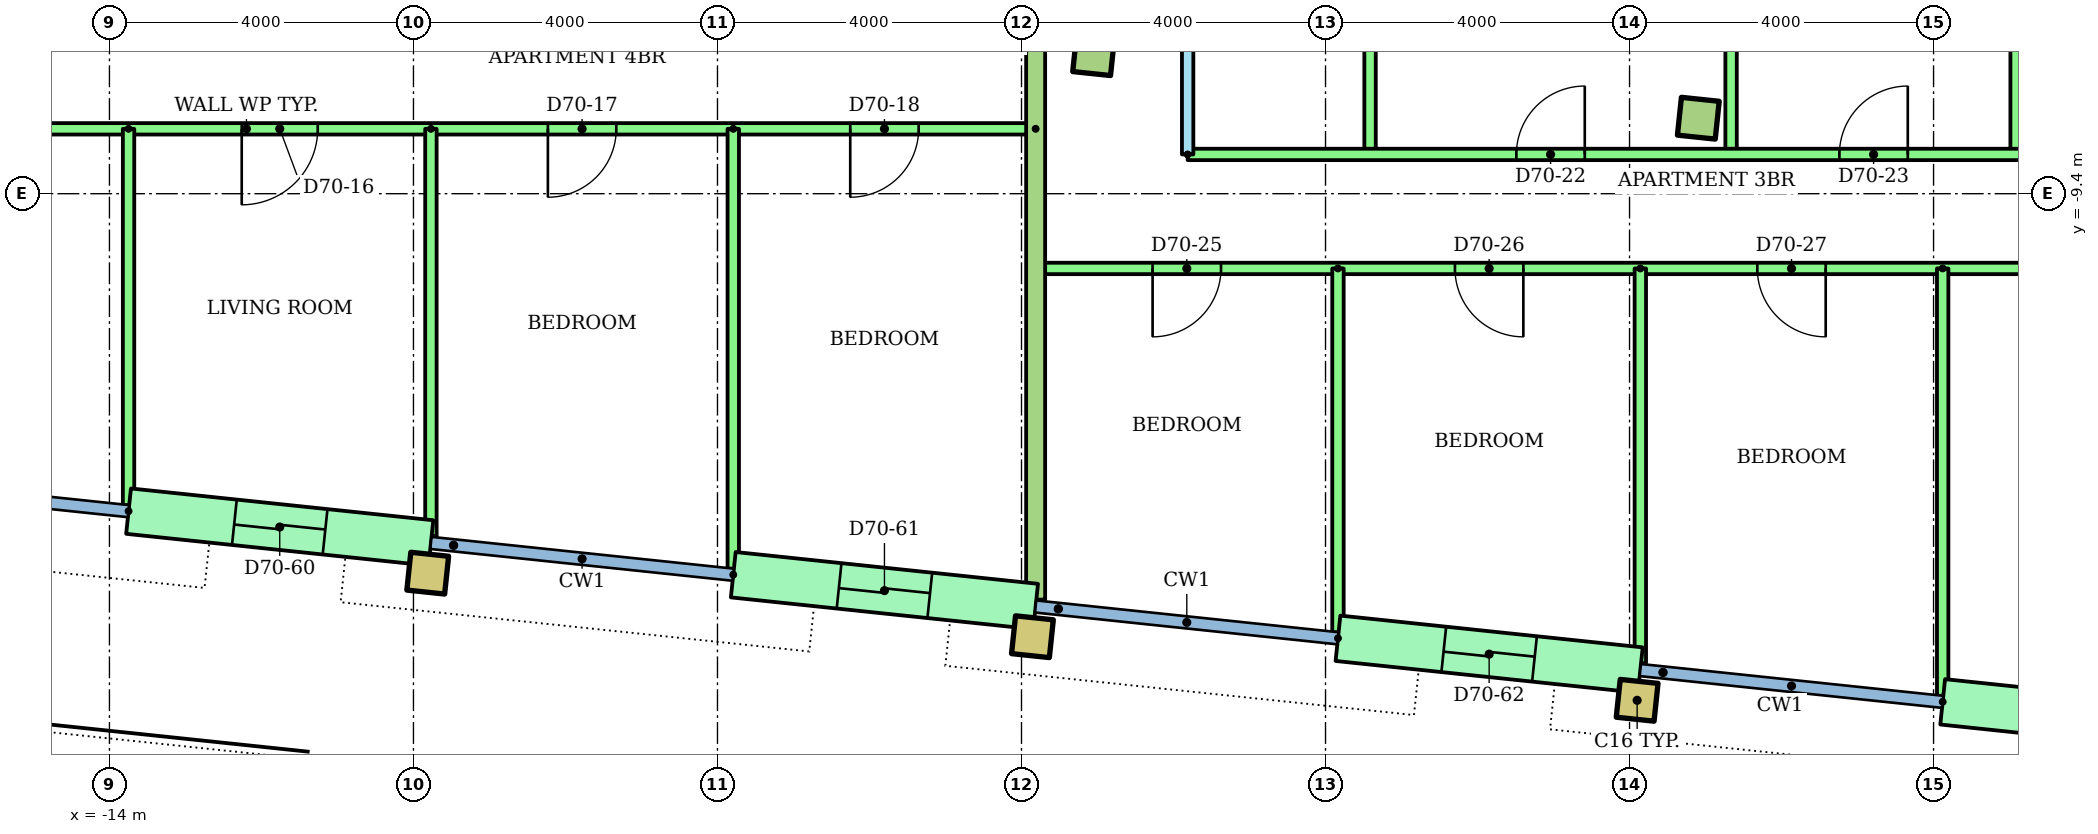
"""IFC4 building model, lengths in metres.
Left out: names, types, materials, properties, quantities, classifications, styles, units other than length and angle.
Written with IfcOpenShell. Run it as: python <this file> out.ifc"""

import sys

from ifc_helpers import new_model, si_unit, direction, frame, frame_2d, origin, origin_2d, place, context, subcontext, project, spatial, rectangle, hollow_rectangle, extrude, element, fill, save


model = new_model("IFC4")
c1 = context("Model", 3, precision=1e-05, world=origin(), true_north=direction((0.0, 1.0)))
c2 = subcontext(c1, "Body", "Model", "MODEL_VIEW")
j1 = project(units=[si_unit("LENGTHUNIT", "METRE"), si_unit("PLANEANGLEUNIT", "RADIAN")], contexts=[c1])
p1 = place(None, origin())
s1 = spatial("IfcSite", under=j1, at=p1, CompositionType="ELEMENT")
p2 = place(p1, origin())
s2 = spatial("IfcBuilding", under=s1, at=p2, CompositionType="ELEMENT")
p3 = place(p2, frame((0.0, 0.0, 269.1)))
s3 = spatial("IfcBuildingStorey", under=s2, at=p3, CompositionType="ELEMENT", Elevation=269.1)
for number, where, z_axis, x_axis in (
    (1, (-9.812, -14.392, 0.0), (0.0, 0.0, 1.0), (0.995, -0.105, 0.0)),
    (2, (-1.856, -15.229, 0.0), (0.0, 0.0, 1.0), (0.995, -0.105, 0.0)),
    (3, (6.1, -16.065, 0.0), (0.0, 0.0, 1.0), (0.995, -0.105, 0.0)),
):
    element("IfcColumn", number, at=place(p3, frame(where, z_axis=z_axis, x_axis=x_axis)), inside=s3, PredefinedType="COLUMN", context=c2, shape_type="SweptSolid", body=[
        extrude(hollow_rectangle(XDim=0.5, YDim=0.5, WallThickness=0.025, at=origin_2d()), origin(), (0.0, 0.0, 1.0), 3.2),
    ])
for number, where, z_axis, x_axis in (
    (4, (-1.051, -7.571, 0.0), (0.0, 0.0, 1.0), (0.995, -0.105, 0.0)),
    (5, (6.905, -8.407, 0.0), (0.0, 0.0, 1.0), (0.995, -0.105, 0.0)),
):
    element("IfcColumn", number, at=place(p3, frame(where, z_axis=z_axis, x_axis=x_axis)), inside=s3, PredefinedType="COLUMN", context=c2, shape_type="SweptSolid", body=[
        extrude(rectangle(XDim=0.5, YDim=0.5, at=origin_2d()), origin(), (0.0, 0.0, 1.0), 3.2),
    ])
p4 = place(p3, frame((-13.749, -13.576, 0.0), z_axis=(0.0, 0.0, 1.0), x_axis=(0.994519156568, -0.104554517933, 0.0)))
e6 = element("IfcWall", 6, at=p4, inside=s3, PredefinedType="STANDARD", context=c2, shape_type="SweptSolid", body=[
    extrude(rectangle(XDim=4.0, YDim=0.6, at=frame_2d((2.0, 0.0))), origin(), (0.0, 0.0, 1.0), 2.92),
])
p5 = place(p4, frame((1.4, 0.0, 0.0)))
e7 = element("IfcOpeningElement", 7, at=p5, cuts=e6, PredefinedType="OPENING", context=c2, shape_type="SweptSolid", body=[
    extrude(rectangle(XDim=1.2, YDim=2.1, at=frame_2d((0.6, 1.05))), frame((0.0, 0.31, 0.0), z_axis=(0.0, -1.0, 0.0), x_axis=(1.0, 0.0, 0.0)), (0.0, 0.0, 1.0), 0.62),
])
p6 = place(p3, frame((-5.792, -14.413, 0.0), z_axis=(0.0, 0.0, 1.0), x_axis=(0.99452550138, -0.104494148666, 0.0)))
e8 = element("IfcWall", 8, at=p6, inside=s3, PredefinedType="STANDARD", context=c2, shape_type="SweptSolid", body=[
    extrude(rectangle(XDim=4.0, YDim=0.6, at=frame_2d((2.0, 0.0))), origin(), (0.0, 0.0, 1.0), 2.92),
])
p7 = place(p6, frame((1.4, 0.0, 0.0)))
e9 = element("IfcOpeningElement", 9, at=p7, cuts=e8, PredefinedType="OPENING", context=c2, shape_type="SweptSolid", body=[
    extrude(rectangle(XDim=1.2, YDim=2.1, at=frame_2d((0.6, 1.05))), frame((0.0, 0.31, 0.0), z_axis=(0.0, -1.0, 0.0), x_axis=(1.0, 0.0, 0.0)), (0.0, 0.0, 1.0), 0.62),
])
p8 = place(p3, frame((2.164, -15.249, 0.0), z_axis=(0.0, 0.0, 1.0), x_axis=(0.99452550138, -0.104494148666, 0.0)))
e10 = element("IfcWall", 10, at=p8, inside=s3, PredefinedType="STANDARD", context=c2, shape_type="SweptSolid", body=[
    extrude(rectangle(XDim=4.0, YDim=0.6, at=frame_2d((2.0, 0.0))), origin(), (0.0, 0.0, 1.0), 2.92),
])
p9 = place(p8, frame((1.4, 0.0, 0.0)))
e11 = element("IfcOpeningElement", 11, at=p9, cuts=e10, PredefinedType="OPENING", context=c2, shape_type="SweptSolid", body=[
    extrude(rectangle(XDim=1.2, YDim=2.1, at=frame_2d((0.6, 1.05))), frame((0.0, 0.31, 0.0), z_axis=(0.0, -1.0, 0.0), x_axis=(1.0, 0.0, 0.0)), (0.0, 0.0, 1.0), 0.62),
])
p10 = place(p3, frame((10.12, -16.085, 0.0), z_axis=(0.0, 0.0, 1.0), x_axis=(0.994519156568, -0.104554517933, 0.0)))
e12 = element("IfcWall", 12, at=p10, inside=s3, PredefinedType="STANDARD", context=c2, shape_type="SweptSolid", body=[
    extrude(rectangle(XDim=4.0, YDim=0.6, at=frame_2d((2.0, 0.0))), origin(), (0.0, 0.0, 1.0), 2.92),
])
p11 = place(p10, frame((1.4, 0.0, 0.0)))
e13 = element("IfcOpeningElement", 13, at=p11, cuts=e12, PredefinedType="OPENING", context=c2, shape_type="SweptSolid", body=[
    extrude(rectangle(XDim=1.2, YDim=2.1, at=frame_2d((0.6, 1.05))), frame((0.0, 0.31, 0.0), z_axis=(0.0, -1.0, 0.0), x_axis=(1.0, 0.0, 0.0)), (0.0, 0.0, 1.0), 0.62),
])
p12 = place(p3, frame((-1.814, -8.547, 0.0), z_axis=(0.0, 0.0, 1.0), x_axis=(-1.0, 0.0, 0.0)))
e14 = element("IfcWall", 14, at=p12, inside=s3, PredefinedType="PARTITIONING", context=c2, shape_type="SweptSolid", body=[
    extrude(rectangle(XDim=20.767, YDim=0.15, at=frame_2d((10.384, 0.0))), origin(), (0.0, 0.0, 1.0), 2.4),
])
p13 = place(p12, frame((16.604, 0.0, 0.0)))
e15 = element("IfcOpeningElement", 15, at=p13, cuts=e14, PredefinedType="OPENING", context=c2, shape_type="SweptSolid", body=[
    extrude(rectangle(XDim=0.9, YDim=2.1, at=frame_2d((0.45, 1.05))), frame((0.0, 0.085, 0.0), z_axis=(0.0, -1.0, 0.0), x_axis=(1.0, 0.0, 0.0)), (0.0, 0.0, 1.0), 0.17),
])
p14 = place(p12, frame((9.446, 0.0, 0.0)))
e16 = element("IfcOpeningElement", 16, at=p14, cuts=e14, PredefinedType="OPENING", context=c2, shape_type="SweptSolid", body=[
    extrude(rectangle(XDim=1.0, YDim=2.1, at=frame_2d((0.5, 1.05))), frame((0.0, 0.085, 0.0), z_axis=(0.0, -1.0, 0.0), x_axis=(1.0, 0.0, 0.0)), (0.0, 0.0, 1.0), 0.17),
])
p15 = place(p12, frame((5.517, 0.0, 0.0)))
e17 = element("IfcOpeningElement", 17, at=p15, cuts=e14, PredefinedType="OPENING", context=c2, shape_type="SweptSolid", body=[
    extrude(rectangle(XDim=0.9, YDim=2.1, at=frame_2d((0.45, 1.05))), frame((0.0, 0.085, 0.0), z_axis=(0.0, -1.0, 0.0), x_axis=(1.0, 0.0, 0.0)), (0.0, 0.0, 1.0), 0.17),
])
p16 = place(p12, frame((1.539, 0.0, 0.0)))
e18 = element("IfcOpeningElement", 18, at=p16, cuts=e14, PredefinedType="OPENING", context=c2, shape_type="SweptSolid", body=[
    extrude(rectangle(XDim=0.9, YDim=2.1, at=frame_2d((0.45, 1.05))), frame((0.0, 0.085, 0.0), z_axis=(0.0, -1.0, 0.0), x_axis=(1.0, 0.0, 0.0)), (0.0, 0.0, 1.0), 0.17),
])
p17 = place(p3, frame((-13.749, -8.547, 0.0), z_axis=(0.0, 0.0, 1.0), x_axis=(0.0, -1.0, 0.0)))
e19 = element("IfcWall", 19, at=p17, inside=s3, PredefinedType="PARTITIONING", context=c2, shape_type="SweptSolid", body=[
    extrude(rectangle(XDim=4.95, YDim=0.15, at=frame_2d((2.475, 0.0))), origin(), (0.0, 0.0, 1.0), 2.4),
])
p18 = place(p3, frame((-9.771, -8.547, 0.0), z_axis=(0.0, 0.0, 1.0), x_axis=(0.0, -1.0, 0.0)))
e20 = element("IfcWall", 20, at=p18, inside=s3, PredefinedType="PARTITIONING", context=c2, shape_type="SweptSolid", body=[
    extrude(rectangle(XDim=5.358, YDim=0.15, at=frame_2d((2.679, 0.0))), origin(), (0.0, 0.0, 1.0), 2.4),
])
p19 = place(p3, frame((-5.792, -8.547, 0.0), z_axis=(0.0, 0.0, 1.0), x_axis=(0.0, -1.0, 0.0)))
e21 = element("IfcWall", 21, at=p19, inside=s3, PredefinedType="PARTITIONING", context=c2, shape_type="SweptSolid", body=[
    extrude(rectangle(XDim=5.787, YDim=0.15, at=frame_2d((2.893, 0.0))), origin(), (0.0, 0.0, 1.0), 2.4),
])
p20 = place(p3, frame((0.186, -1.4, 0.0), z_axis=(0.0, 0.0, 1.0), x_axis=(0.0, -1.0, 0.0)))
e22 = element("IfcWall", 22, at=p20, inside=s3, PredefinedType="PARTITIONING", context=c2, shape_type="SweptSolid", body=[
    extrude(rectangle(XDim=7.484, YDim=0.15, at=frame_2d((3.742, 0.0))), origin(), (0.0, 0.0, 1.0), 2.4),
])
p21 = place(p20, frame((1.55, 0.0, 0.0)))
e23 = element("IfcOpeningElement", 23, at=p21, cuts=e22, PredefinedType="OPENING", context=c2, shape_type="SweptSolid", body=[
    extrude(rectangle(XDim=0.9, YDim=2.1, at=frame_2d((0.45, 1.05))), frame((0.0, 0.085, 0.0), z_axis=(0.0, -1.0, 0.0), x_axis=(1.0, 0.0, 0.0)), (0.0, 0.0, 1.0), 0.17),
])
p22 = place(p20, frame((4.966, 0.0, 0.0)))
e24 = element("IfcOpeningElement", 24, at=p22, cuts=e22, PredefinedType="OPENING", context=c2, shape_type="SweptSolid", body=[
    extrude(rectangle(XDim=0.8, YDim=2.1, at=frame_2d((0.4, 1.05))), frame((0.0, 0.085, 0.0), z_axis=(0.0, -1.0, 0.0), x_axis=(1.0, 0.0, 0.0)), (0.0, 0.0, 1.0), 0.17),
])
for number, where, z_axis, x_axis in (
    (25, (2.586, -1.4, 0.0), (0.0, 0.0, 1.0), (0.0, -1.0, 0.0)),
    (26, (7.336, -1.4, 0.0), (0.0, 0.0, 1.0), (0.0, -1.0, 0.0)),
    (27, (11.086, -1.4, 0.0), (0.0, 0.0, 1.0), (0.0, -1.0, 0.0)),
):
    element("IfcWall", number, at=place(p3, frame(where, z_axis=z_axis, x_axis=x_axis)), inside=s3, PredefinedType="PARTITIONING", context=c2, shape_type="SweptSolid", body=[
        extrude(rectangle(XDim=7.484, YDim=0.15, at=frame_2d((3.742, 0.0))), origin(), (0.0, 0.0, 1.0), 2.4),
    ])
p23 = place(p3, frame((0.186, -8.884, 0.0)))
e28 = element("IfcWall", 28, at=p23, inside=s3, PredefinedType="PARTITIONING", context=c2, shape_type="SweptSolid", body=[
    extrude(rectangle(XDim=13.912, YDim=0.15, at=frame_2d((6.956, 0.0))), origin(), (0.0, 0.0, 1.0), 2.4),
])
p24 = place(p23, frame((4.325, 0.0, 0.0)))
e29 = element("IfcOpeningElement", 29, at=p24, cuts=e28, PredefinedType="OPENING", context=c2, shape_type="SweptSolid", body=[
    extrude(rectangle(XDim=0.9, YDim=2.1, at=frame_2d((0.45, 1.05))), frame((0.0, 0.085, 0.0), z_axis=(0.0, -1.0, 0.0), x_axis=(1.0, 0.0, 0.0)), (0.0, 0.0, 1.0), 0.17),
])
p25 = place(p23, frame((8.575, 0.0, 0.0)))
e30 = element("IfcOpeningElement", 30, at=p25, cuts=e28, PredefinedType="OPENING", context=c2, shape_type="SweptSolid", body=[
    extrude(rectangle(XDim=0.9, YDim=2.1, at=frame_2d((0.45, 1.05))), frame((0.0, 0.085, 0.0), z_axis=(0.0, -1.0, 0.0), x_axis=(1.0, 0.0, 0.0)), (0.0, 0.0, 1.0), 0.17),
])
p26 = place(p23, frame((11.956, 0.0, 0.0)))
e31 = element("IfcOpeningElement", 31, at=p26, cuts=e28, PredefinedType="OPENING", context=c2, shape_type="SweptSolid", body=[
    extrude(rectangle(XDim=0.9, YDim=2.1, at=frame_2d((0.45, 1.05))), frame((0.0, 0.085, 0.0), z_axis=(0.0, -1.0, 0.0), x_axis=(1.0, 0.0, 0.0)), (0.0, 0.0, 1.0), 0.17),
])
p27 = place(p3, frame((14.098, -10.384, 0.0), z_axis=(0.0, 0.0, 1.0), x_axis=(-1.0, 0.0, 0.0)))
e32 = element("IfcWall", 32, at=p27, inside=s3, PredefinedType="PARTITIONING", context=c2, shape_type="SweptSolid", body=[
    extrude(rectangle(XDim=15.912, YDim=0.15, at=frame_2d((7.956, 0.0))), origin(), (0.0, 0.0, 1.0), 2.4),
])
p28 = place(p27, frame((13.473, 0.0, 0.0)))
e33 = element("IfcOpeningElement", 33, at=p28, cuts=e32, PredefinedType="OPENING", context=c2, shape_type="SweptSolid", body=[
    extrude(rectangle(XDim=0.9, YDim=2.1, at=frame_2d((0.45, 1.05))), frame((0.0, 0.085, 0.0), z_axis=(0.0, -1.0, 0.0), x_axis=(1.0, 0.0, 0.0)), (0.0, 0.0, 1.0), 0.17),
])
p29 = place(p27, frame((9.495, 0.0, 0.0)))
e34 = element("IfcOpeningElement", 34, at=p29, cuts=e32, PredefinedType="OPENING", context=c2, shape_type="SweptSolid", body=[
    extrude(rectangle(XDim=0.9, YDim=2.1, at=frame_2d((0.45, 1.05))), frame((0.0, 0.085, 0.0), z_axis=(0.0, -1.0, 0.0), x_axis=(1.0, 0.0, 0.0)), (0.0, 0.0, 1.0), 0.17),
])
p30 = place(p27, frame((5.517, 0.0, 0.0)))
e35 = element("IfcOpeningElement", 35, at=p30, cuts=e32, PredefinedType="OPENING", context=c2, shape_type="SweptSolid", body=[
    extrude(rectangle(XDim=0.9, YDim=2.1, at=frame_2d((0.45, 1.05))), frame((0.0, 0.085, 0.0), z_axis=(0.0, -1.0, 0.0), x_axis=(1.0, 0.0, 0.0)), (0.0, 0.0, 1.0), 0.17),
])
p31 = place(p27, frame((1.489, 0.0, 0.0)))
e36 = element("IfcOpeningElement", 36, at=p31, cuts=e32, PredefinedType="OPENING", context=c2, shape_type="SweptSolid", body=[
    extrude(rectangle(XDim=1.0, YDim=2.1, at=frame_2d((0.5, 1.05))), frame((0.0, 0.085, 0.0), z_axis=(0.0, -1.0, 0.0), x_axis=(1.0, 0.0, 0.0)), (0.0, 0.0, 1.0), 0.17),
])
p32 = place(p3, frame((2.164, -10.384, 0.0), z_axis=(0.0, 0.0, 1.0), x_axis=(0.0, -1.0, 0.0)))
e37 = element("IfcWall", 37, at=p32, inside=s3, PredefinedType="PARTITIONING", context=c2, shape_type="SweptSolid", body=[
    extrude(rectangle(XDim=4.786, YDim=0.15, at=frame_2d((2.393, 0.0))), origin(), (0.0, 0.0, 1.0), 2.4),
])
p33 = place(p3, frame((6.142, -10.384, 0.0), z_axis=(0.0, 0.0, 1.0), x_axis=(0.0, -1.0, 0.0)))
e38 = element("IfcWall", 38, at=p33, inside=s3, PredefinedType="PARTITIONING", context=c2, shape_type="SweptSolid", body=[
    extrude(rectangle(XDim=5.193, YDim=0.15, at=frame_2d((2.597, 0.0))), origin(), (0.0, 0.0, 1.0), 2.4),
])
p34 = place(p3, frame((10.12, -10.384, 0.0), z_axis=(0.0, 0.0, 1.0), x_axis=(0.0, -1.0, 0.0)))
e39 = element("IfcWall", 39, at=p34, inside=s3, PredefinedType="PARTITIONING", context=c2, shape_type="SweptSolid", body=[
    extrude(rectangle(XDim=5.622, YDim=0.15, at=frame_2d((2.811, 0.0))), origin(), (0.0, 0.0, 1.0), 2.4),
])
p35 = place(p3, frame((-1.814, -1.4, 0.0), z_axis=(0.0, 0.0, 1.0), x_axis=(0.0, -1.0, 0.0)))
e40 = element("IfcWall", 40, at=p35, inside=s3, PredefinedType="PARTITIONING", context=c2, shape_type="SweptSolid", body=[
    extrude(rectangle(XDim=13.341, YDim=0.25, at=frame_2d((6.67, 0.0))), origin(), (0.0, 0.0, 1.0), 2.4),
])
p36 = place(p14, origin())
e41 = element("IfcDoor", 41, at=p36, inside=s3, OperationType="SINGLE_SWING_RIGHT", PredefinedType="DOOR", context=c2, shape_type="SweptSolid", body=[
    extrude(rectangle(XDim=1.0, YDim=2.1, at=frame_2d((0.5, 1.05))), frame((0.0, 0.025, 0.0), z_axis=(0.0, -1.0, 0.0), x_axis=(1.0, 0.0, 0.0)), (0.0, 0.0, 1.0), 0.05),
])
fill(e16, e41)
p37 = place(p15, origin())
e42 = element("IfcDoor", 42, at=p37, inside=s3, OperationType="SINGLE_SWING_RIGHT", PredefinedType="DOOR", context=c2, shape_type="SweptSolid", body=[
    extrude(rectangle(XDim=0.9, YDim=2.1, at=frame_2d((0.45, 1.05))), frame((0.0, 0.025, 0.0), z_axis=(0.0, -1.0, 0.0), x_axis=(1.0, 0.0, 0.0)), (0.0, 0.0, 1.0), 0.05),
])
fill(e17, e42)
p38 = place(p16, origin())
e43 = element("IfcDoor", 43, at=p38, inside=s3, OperationType="SINGLE_SWING_RIGHT", PredefinedType="DOOR", context=c2, shape_type="SweptSolid", body=[
    extrude(rectangle(XDim=0.9, YDim=2.1, at=frame_2d((0.45, 1.05))), frame((0.0, 0.025, 0.0), z_axis=(0.0, -1.0, 0.0), x_axis=(1.0, 0.0, 0.0)), (0.0, 0.0, 1.0), 0.05),
])
fill(e18, e43)
p39 = place(p24, origin())
e44 = element("IfcDoor", 44, at=p39, inside=s3, OperationType="SINGLE_SWING_RIGHT", PredefinedType="DOOR", context=c2, shape_type="SweptSolid", body=[
    extrude(rectangle(XDim=0.9, YDim=2.1, at=frame_2d((0.45, 1.05))), frame((0.0, 0.025, 0.0), z_axis=(0.0, -1.0, 0.0), x_axis=(1.0, 0.0, 0.0)), (0.0, 0.0, 1.0), 0.05),
])
fill(e29, e44)
p40 = place(p25, origin())
e45 = element("IfcDoor", 45, at=p40, inside=s3, OperationType="SINGLE_SWING_RIGHT", PredefinedType="DOOR", context=c2, shape_type="SweptSolid", body=[
    extrude(rectangle(XDim=0.9, YDim=2.1, at=frame_2d((0.45, 1.05))), frame((0.0, 0.025, 0.0), z_axis=(0.0, -1.0, 0.0), x_axis=(1.0, 0.0, 0.0)), (0.0, 0.0, 1.0), 0.05),
])
fill(e30, e45)
p41 = place(p28, origin())
e46 = element("IfcDoor", 46, at=p41, inside=s3, OperationType="SINGLE_SWING_RIGHT", PredefinedType="DOOR", context=c2, shape_type="SweptSolid", body=[
    extrude(rectangle(XDim=0.9, YDim=2.1, at=frame_2d((0.45, 1.05))), frame((0.0, 0.025, 0.0), z_axis=(0.0, -1.0, 0.0), x_axis=(1.0, 0.0, 0.0)), (0.0, 0.0, 1.0), 0.05),
])
fill(e33, e46)
p42 = place(p29, origin())
e47 = element("IfcDoor", 47, at=p42, inside=s3, OperationType="SINGLE_SWING_LEFT", PredefinedType="DOOR", context=c2, shape_type="SweptSolid", body=[
    extrude(rectangle(XDim=0.9, YDim=2.1, at=frame_2d((0.45, 1.05))), frame((0.0, 0.025, 0.0), z_axis=(0.0, -1.0, 0.0), x_axis=(1.0, 0.0, 0.0)), (0.0, 0.0, 1.0), 0.05),
])
fill(e34, e47)
p43 = place(p30, origin())
e48 = element("IfcDoor", 48, at=p43, inside=s3, OperationType="SINGLE_SWING_LEFT", PredefinedType="DOOR", context=c2, shape_type="SweptSolid", body=[
    extrude(rectangle(XDim=0.9, YDim=2.1, at=frame_2d((0.45, 1.05))), frame((0.0, 0.025, 0.0), z_axis=(0.0, -1.0, 0.0), x_axis=(1.0, 0.0, 0.0)), (0.0, 0.0, 1.0), 0.05),
])
fill(e35, e48)
p44 = place(p5, origin())
e49 = element("IfcDoor", 49, at=p44, inside=s3, OperationType="SLIDING_TO_LEFT", PredefinedType="DOOR", context=c2, shape_type="SweptSolid", body=[
    extrude(rectangle(XDim=1.2, YDim=2.1, at=frame_2d((0.6, 1.05))), frame((0.0, 0.025, 0.0), z_axis=(0.0, -1.0, 0.0), x_axis=(1.0, 0.0, 0.0)), (0.0, 0.0, 1.0), 0.05),
])
fill(e7, e49)
p45 = place(p7, origin())
e50 = element("IfcDoor", 50, at=p45, inside=s3, OperationType="SLIDING_TO_LEFT", PredefinedType="DOOR", context=c2, shape_type="SweptSolid", body=[
    extrude(rectangle(XDim=1.2, YDim=2.1, at=frame_2d((0.6, 1.05))), frame((0.0, 0.025, 0.0), z_axis=(0.0, -1.0, 0.0), x_axis=(1.0, 0.0, 0.0)), (0.0, 0.0, 1.0), 0.05),
])
fill(e9, e50)
p46 = place(p9, origin())
e51 = element("IfcDoor", 51, at=p46, inside=s3, OperationType="SLIDING_TO_LEFT", PredefinedType="DOOR", context=c2, shape_type="SweptSolid", body=[
    extrude(rectangle(XDim=1.2, YDim=2.1, at=frame_2d((0.6, 1.05))), frame((0.0, 0.025, 0.0), z_axis=(0.0, -1.0, 0.0), x_axis=(1.0, 0.0, 0.0)), (0.0, 0.0, 1.0), 0.05),
])
fill(e11, e51)
save(model, sys.argv[1])
